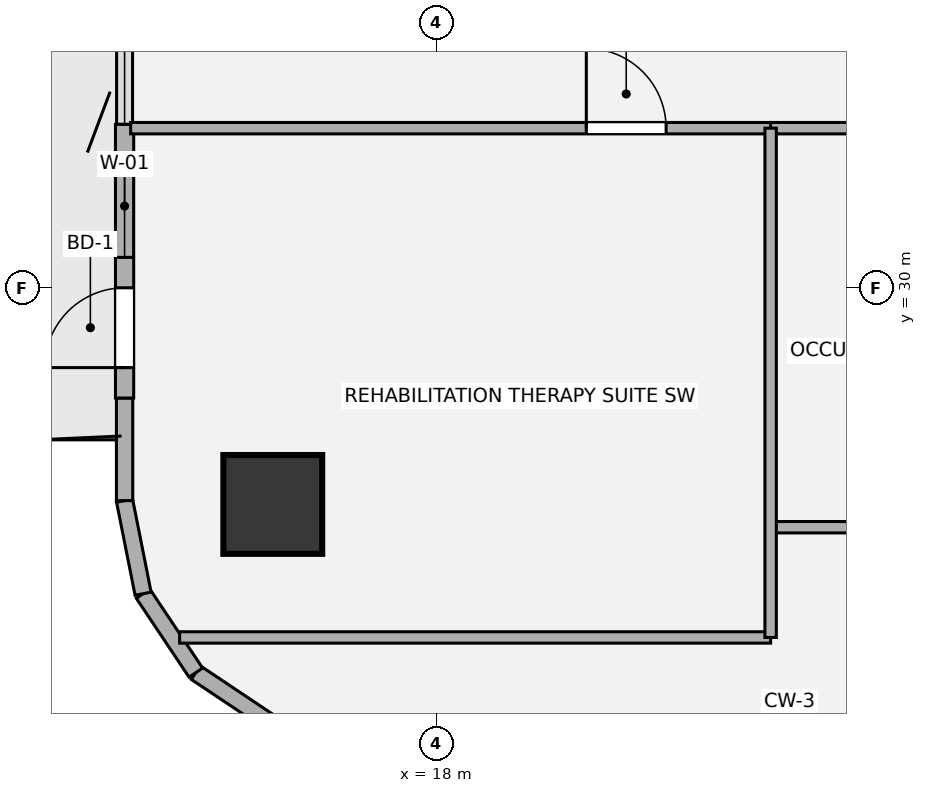
"""IFC4 building model, lengths in metres.
Left out: names, types, materials, properties, quantities, classifications, styles, units other than length and angle.
Written with IfcOpenShell. Run it as: python <this file> out.ifc"""

import sys

from ifc_helpers import new_model, si_unit, direction, frame, frame_2d, origin, origin_2d, place, context, subcontext, project, spatial, rectangle, hollow_circle, extrude, source, transform, mapped, element, fill, save


model = new_model("IFC4")
c1 = context("Model", 3, precision=1e-05, world=origin(), true_north=direction((0.0, 1.0)))
c2 = subcontext(c1, "Body", "Model", "MODEL_VIEW")
j1 = project(units=[si_unit("LENGTHUNIT", "METRE"), si_unit("PLANEANGLEUNIT", "RADIAN")], contexts=[c1])
p1 = place(None, origin())
s1 = spatial("IfcSite", under=j1, at=p1, CompositionType="ELEMENT")
p2 = place(p1, origin())
s2 = spatial("IfcBuilding", under=s1, at=p2, CompositionType="ELEMENT")
p3 = place(p2, frame((0.0, 0.0, 112.5)))
s3 = spatial("IfcBuildingStorey", under=s2, at=p3, CompositionType="ELEMENT", Elevation=112.5)
m1 = source(origin(), c2, "Body", "SweptSolid", [
    extrude(hollow_circle(Radius=0.65, WallThickness=0.045, at=origin_2d()), origin(), (0.0, 0.0, 1.0), 3.78),
])
p4 = place(p3, frame((15.85, 27.15, 0.0), z_axis=(0.0, 0.0, 1.0), x_axis=(1.0, 0.0, 0.0)))
e1 = element("IfcColumn", 1, at=p4, inside=s3, PredefinedType="COLUMN", context=c2, shape_type="MappedRepresentation", body=[
    mapped(m1, transform((0.0, 0.0, 0.0), x_axis=(1.0, 0.0, 0.0), y_axis=(0.0, 1.0, 0.0), z_axis=(0.0, 0.0, 1.0), scale=1.0)),
])
for number, where, z_axis, x_axis in (
    (2, (15.875, 24.244, 0.0), (0.0, 0.0, 1.0), (-0.831, 0.556, 0.0)),
    (3, (14.837, 24.937, 0.0), (0.0, 0.0, 1.0), (-0.556, 0.831, 0.0)),
    (4, (14.144, 25.975, 0.0), (0.0, 0.0, 1.0), (-0.195, 0.981, 0.0)),
):
    element("IfcWall", number, at=place(p3, frame(where, z_axis=z_axis, x_axis=x_axis)), inside=s3, PredefinedType="SOLIDWALL", context=c2, shape_type="SweptSolid", body=[
        extrude(rectangle(XDim=1.249, YDim=0.215, at=frame_2d((0.624, 0.0))), origin(), (0.0, 0.0, 1.0), 3.53),
    ])
p5 = place(p3, frame((13.9, 27.2, 0.0), z_axis=(0.0, 0.0, 1.0), x_axis=(0.0, 1.0, 0.0)))
e5 = element("IfcWall", 5, at=p5, inside=s3, PredefinedType="SOLIDWALL", context=c2, shape_type="SweptSolid", body=[
    extrude(rectangle(XDim=1.35, YDim=0.215, at=frame_2d((0.675, 0.0))), origin(), (0.0, 0.0, 1.0), 3.53),
])
p6 = place(p3, frame((13.9, 28.55, 0.0), z_axis=(0.0, 0.0, 1.0), x_axis=(0.0, 1.0, 0.0)))
e6 = element("IfcWall", 6, at=p6, inside=s3, PredefinedType="SOLIDWALL", context=c2, shape_type="SweptSolid", body=[
    extrude(rectangle(XDim=3.6, YDim=0.24, at=frame_2d((1.8, 0.0))), origin(), (0.0, 0.0, 1.0), 3.53),
])
p7 = place(p6, frame((0.4, 0.0, 0.0)))
e7 = element("IfcOpeningElement", 7, at=p7, cuts=e6, PredefinedType="OPENING", context=c2, shape_type="SweptSolid", body=[
    extrude(rectangle(XDim=1.05, YDim=2.15, at=origin_2d()), frame((0.525, 0.13, 1.075), z_axis=(0.0, -1.0, 0.0), x_axis=(1.0, 0.0, 0.0)), (0.0, 0.0, 1.0), 0.26),
])
p8 = place(p6, frame((1.85, 0.0, 0.85)))
e8 = element("IfcOpeningElement", 8, at=p8, cuts=e6, PredefinedType="OPENING", context=c2, shape_type="SweptSolid", body=[
    extrude(rectangle(XDim=1.35, YDim=1.35, at=origin_2d()), frame((0.675, 0.13, 0.675), z_axis=(0.0, -1.0, 0.0), x_axis=(1.0, 0.0, 0.0)), (0.0, 0.0, 1.0), 0.26),
])
p9 = place(p3, frame((14.624, 25.4, 0.0), z_axis=(0.0, 0.0, 1.0), x_axis=(1.0, 0.0, 0.0)))
e9 = element("IfcWall", 9, at=p9, inside=s3, PredefinedType="PARTITIONING", context=c2, shape_type="SweptSolid", body=[
    extrude(rectangle(XDim=7.776, YDim=0.15, at=frame_2d((3.888, 0.0))), origin(), (0.0, 0.0, 1.0), 3.5),
])
p10 = place(p3, frame((22.4, 26.85, 0.0), z_axis=(0.0, 0.0, 1.0), x_axis=(1.0, 0.0, 0.0)))
e10 = element("IfcWall", 10, at=p10, inside=s3, PredefinedType="PARTITIONING", context=c2, shape_type="SweptSolid", body=[
    extrude(rectangle(XDim=6.1, YDim=0.15, at=frame_2d((3.05, 0.0))), origin(), (0.0, 0.0, 1.0), 3.055),
])
p11 = place(p3, frame((13.98, 32.1, 0.0), z_axis=(0.0, 0.0, 1.0), x_axis=(1.0, 0.0, 0.0)))
e11 = element("IfcWall", 11, at=p11, inside=s3, PredefinedType="PARTITIONING", context=c2, shape_type="SweptSolid", body=[
    extrude(rectangle(XDim=8.42, YDim=0.15, at=frame_2d((4.21, 0.0))), origin(), (0.0, 0.0, 1.0), 2.982),
])
p12 = place(p11, frame((5.995, 0.0, 0.0)))
e12 = element("IfcOpeningElement", 12, at=p12, cuts=e11, PredefinedType="OPENING", context=c2, shape_type="SweptSolid", body=[
    extrude(rectangle(XDim=1.05, YDim=2.1, at=origin_2d()), frame((0.525, 0.085, 1.05), z_axis=(0.0, -1.0, 0.0), x_axis=(1.0, 0.0, 0.0)), (0.0, 0.0, 1.0), 0.17),
])
p13 = place(p3, frame((22.4, 32.1, 0.0), z_axis=(0.0, 0.0, 1.0), x_axis=(1.0, 0.0, 0.0)))
e13 = element("IfcWall", 13, at=p13, inside=s3, PredefinedType="PARTITIONING", context=c2, shape_type="SweptSolid", body=[
    extrude(rectangle(XDim=6.1, YDim=0.15, at=frame_2d((3.05, 0.0))), origin(), (0.0, 0.0, 1.0), 2.982),
])
p14 = place(p13, frame((2.525, 0.0, 0.0)))
e14 = element("IfcOpeningElement", 14, at=p14, cuts=e13, PredefinedType="OPENING", context=c2, shape_type="SweptSolid", body=[
    extrude(rectangle(XDim=1.05, YDim=2.1, at=origin_2d()), frame((0.525, 0.085, 1.05), z_axis=(0.0, -1.0, 0.0), x_axis=(1.0, 0.0, 0.0)), (0.0, 0.0, 1.0), 0.17),
])
p15 = place(p3, frame((22.4, 25.4, 0.0), z_axis=(0.0, 0.0, 1.0), x_axis=(0.0, 1.0, 0.0)))
e15 = element("IfcWall", 15, at=p15, inside=s3, PredefinedType="PARTITIONING", context=c2, shape_type="SweptSolid", body=[
    extrude(rectangle(XDim=6.7, YDim=0.15, at=frame_2d((3.35, 0.0))), origin(), (0.0, 0.0, 1.0), 3.5),
])
m2 = source(origin(), c2, "Body", "SweptSolid", [
    extrude(rectangle(XDim=1.05, YDim=2.15, at=origin_2d()), frame((0.525, 0.025, 1.075), z_axis=(0.0, -1.0, 0.0), x_axis=(1.0, 0.0, 0.0)), (0.0, 0.0, 1.0), 0.05),
])
p16 = place(p7, origin())
e16 = element("IfcDoor", 16, at=p16, inside=s3, OperationType="SINGLE_SWING_LEFT", PredefinedType="DOOR", context=c2, shape_type="MappedRepresentation", body=[
    mapped(m2, transform((0.0, 0.0, 0.0), x_axis=(1.0, 0.0, 0.0), y_axis=(0.0, 1.0, 0.0), z_axis=(0.0, 0.0, 1.0), scale=1.0)),
])
fill(e7, e16)
m3 = source(origin(), c2, "Body", "SweptSolid", [
    extrude(rectangle(XDim=1.35, YDim=1.35, at=origin_2d()), frame((0.675, 0.03, 0.675), z_axis=(0.0, -1.0, 0.0), x_axis=(1.0, 0.0, 0.0)), (0.0, 0.0, 1.0), 0.06),
])
p17 = place(p8, origin())
e17 = element("IfcWindow", 17, at=p17, inside=s3, PartitioningType="SINGLE_PANEL", PredefinedType="WINDOW", context=c2, shape_type="MappedRepresentation", body=[
    mapped(m3, transform((0.0, 0.0, 0.0), x_axis=(1.0, 0.0, 0.0), y_axis=(0.0, 1.0, 0.0), z_axis=(0.0, 0.0, 1.0), scale=1.0)),
])
fill(e8, e17)
m4 = source(origin(), c2, "Body", "SweptSolid", [
    extrude(rectangle(XDim=1.05, YDim=2.1, at=origin_2d()), frame((0.525, 0.025, 1.05), z_axis=(0.0, -1.0, 0.0), x_axis=(1.0, 0.0, 0.0)), (0.0, 0.0, 1.0), 0.05),
])
p18 = place(p12, origin())
e18 = element("IfcDoor", 18, at=p18, inside=s3, OperationType="SINGLE_SWING_LEFT", PredefinedType="DOOR", context=c2, shape_type="MappedRepresentation", body=[
    mapped(m4, transform((0.0, 0.0, 0.0), x_axis=(1.0, 0.0, 0.0), y_axis=(0.0, 1.0, 0.0), z_axis=(0.0, 0.0, 1.0), scale=1.0)),
])
fill(e12, e18)
save(model, sys.argv[1])
